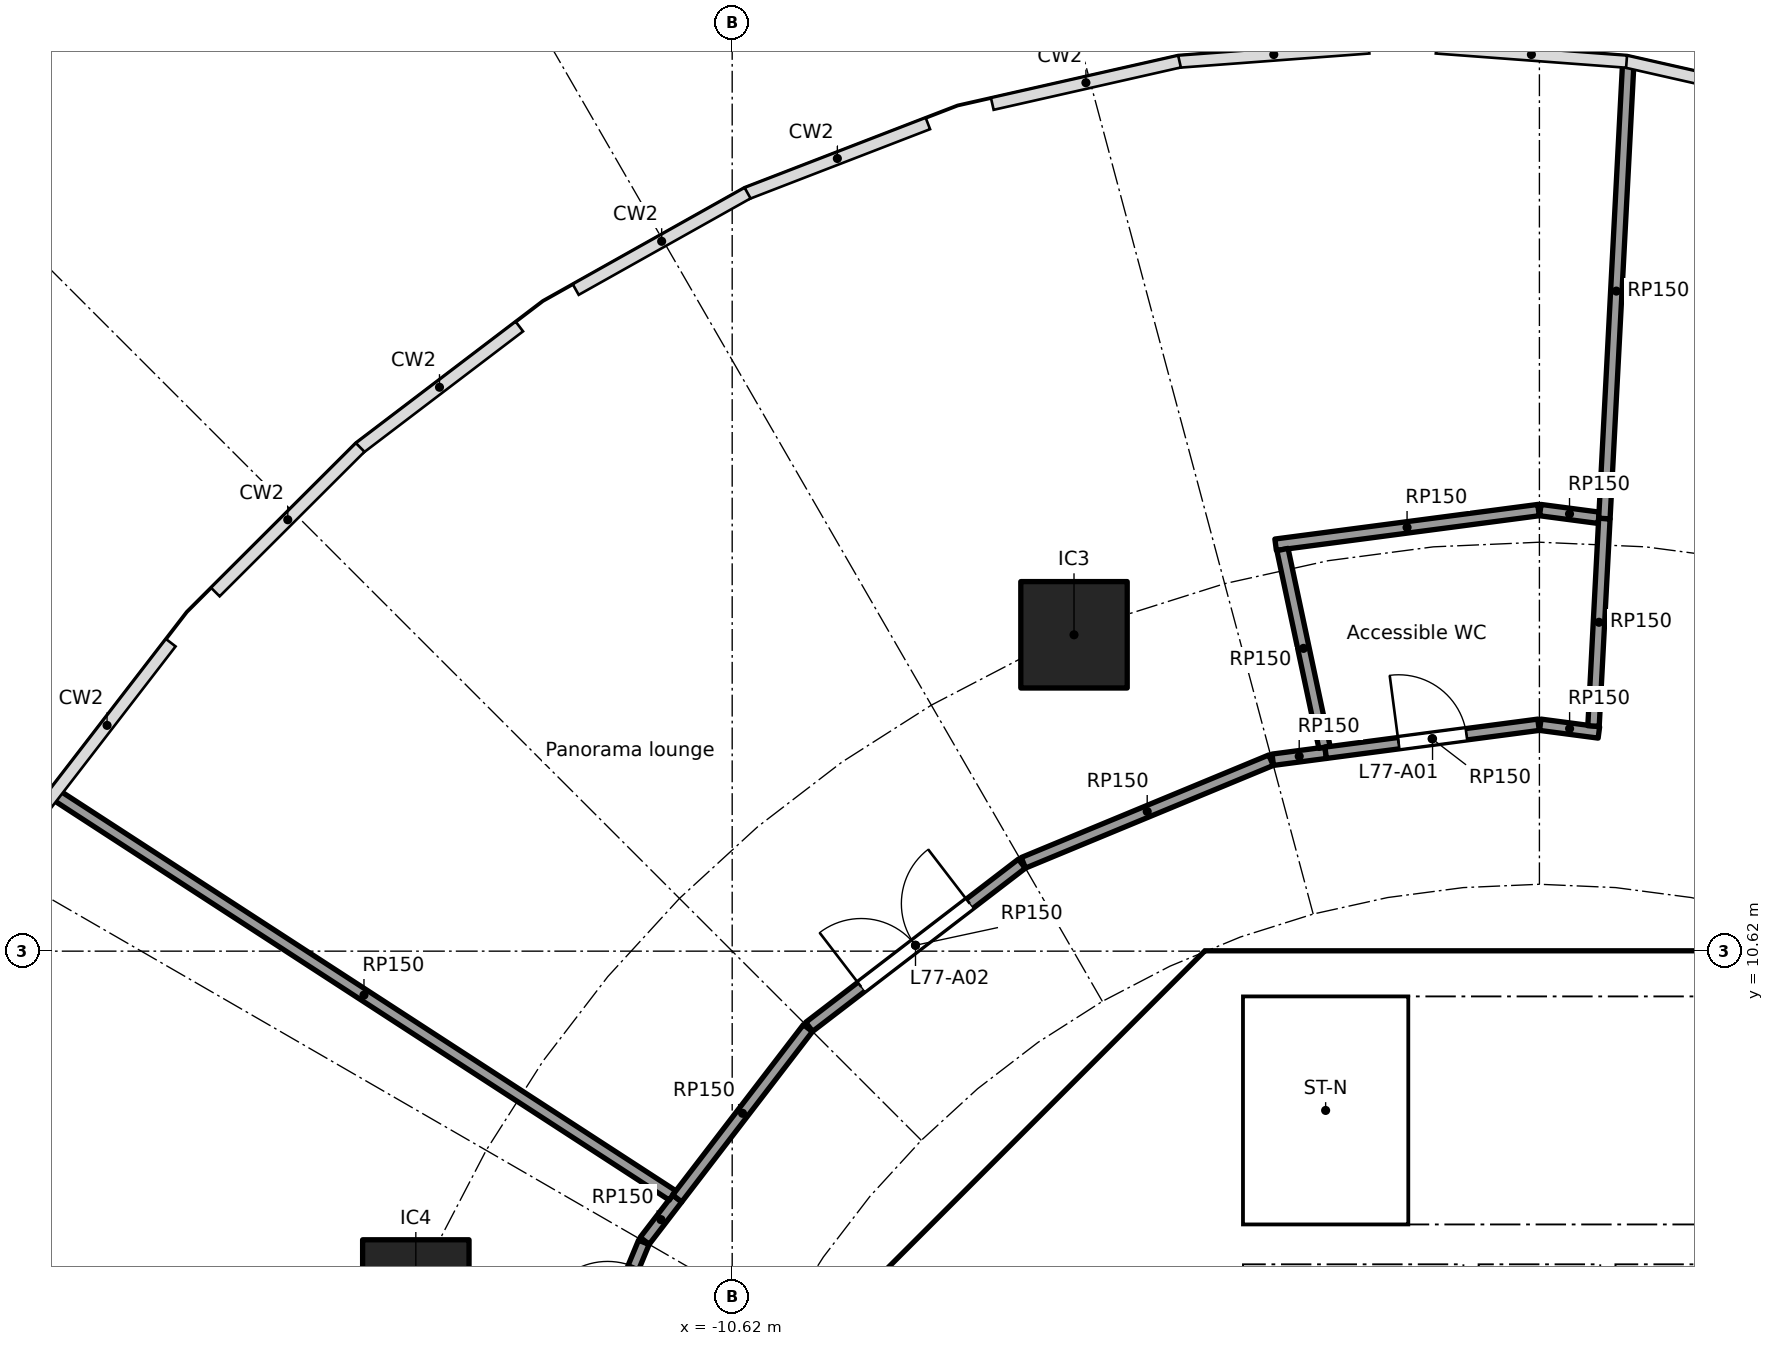
"""IFC4 building model, lengths in metres.
Left out: names, types, materials, properties, quantities, classifications, styles, units other than length and angle.
Written with IfcOpenShell. Run it as: python <this file> out.ifc"""

import sys

from ifc_helpers import new_model, si_unit, direction, frame, frame_2d, origin, origin_2d, place, context, subcontext, project, spatial, polyline, rectangle, outline, extrude, element, fill, save


model = new_model("IFC4")
c1 = context("Model", 3, precision=1e-05, world=origin(), true_north=direction((0.0, 1.0)))
c2 = subcontext(c1, "Body", "Model", "MODEL_VIEW")
j1 = project(units=[si_unit("LENGTHUNIT", "METRE"), si_unit("PLANEANGLEUNIT", "RADIAN")], contexts=[c1])
p1 = place(None, origin())
s1 = spatial("IfcSite", under=j1, at=p1, CompositionType="ELEMENT")
p2 = place(p1, origin())
s2 = spatial("IfcBuilding", under=s1, at=p2, CompositionType="ELEMENT")
p3 = place(p2, frame((0.0, 0.0, 310.3)))
s3 = spatial("IfcBuildingStorey", under=s2, at=p3, CompositionType="ELEMENT", Elevation=310.3)
for number, where, z_axis, x_axis in (
    (1, (-6.123, 14.782, 0.0), (0.0, 0.0, 1.0), (1.0, 0.0, 0.0)),
    (2, (-14.782, 6.123, 0.0), (0.0, 0.0, 1.0), (1.0, 0.0, 0.0)),
):
    element("IfcColumn", number, at=place(p3, frame(where, z_axis=z_axis, x_axis=x_axis)), inside=s3, PredefinedType="COLUMN", context=c2, shape_type="SweptSolid", body=[
        extrude(rectangle(XDim=1.4, YDim=1.4, at=origin_2d()), origin(), (0.0, 0.0, 1.0), 5.6),
    ])
p4 = place(p3, frame((-4.613, 9.988, 0.0), z_axis=(0.0, 0.0, 1.0), x_axis=(-0.707106781187, -0.707106781187, 0.0)))
e3 = element("IfcWall", 3, at=p4, inside=s3, PredefinedType="SHEAR", context=c2, shape_type="SweptSolid", body=[
    extrude(rectangle(XDim=7.602, YDim=0.6, at=frame_2d((3.801, 0.0))), origin(), (0.0, 0.0, 1.0), 5.3),
])
p5 = place(p4, frame((0.351, 0.0, 0.0)))
e4 = element("IfcOpeningElement", 4, at=p5, cuts=e3, PredefinedType="OPENING", context=c2, shape_type="SweptSolid", body=[
    extrude(rectangle(XDim=1.1, YDim=2.1, at=frame_2d((0.55, 1.05))), frame((0.0, 0.31, 0.0), z_axis=(0.0, -1.0, 0.0), x_axis=(1.0, 0.0, 0.0)), (0.0, 0.0, 1.0), 0.62),
])
p6 = place(p3, frame((-7.0, 4.1, 0.0), z_axis=(0.0, 0.0, 1.0), x_axis=(0.0, 1.0, 0.0)))
e5 = element("IfcWall", 5, at=p6, inside=s3, PredefinedType="PARTITIONING", context=c2, shape_type="SweptSolid", body=[
    extrude(rectangle(XDim=2.927, YDim=0.15, at=frame_2d((1.463, 0.0))), origin(), (0.0, 0.0, 1.0), 5.3),
])
p7 = place(p6, frame((1.051, 0.0, 0.0)))
e6 = element("IfcOpeningElement", 6, at=p7, cuts=e5, PredefinedType="OPENING", context=c2, shape_type="SweptSolid", body=[
    extrude(rectangle(XDim=0.9, YDim=2.1, at=frame_2d((0.45, 1.05))), frame((0.0, 0.085, 0.0), z_axis=(0.0, -1.0, 0.0), x_axis=(1.0, 0.0, 0.0)), (0.0, 0.0, 1.0), 0.17),
])
p8 = place(p3, frame((-4.0, 4.3, 0.0), z_axis=(0.0, 0.0, 1.0), x_axis=(0.0, 1.0, 0.0)))
e7 = element("IfcWall", 7, at=p8, inside=s3, PredefinedType="SOLIDWALL", context=c2, shape_type="SweptSolid", body=[
    extrude(rectangle(XDim=2.2, YDim=0.2, at=frame_2d((1.1, 0.0))), origin(), (0.0, 0.0, 1.0), 5.3),
])
p9 = place(p8, frame((0.55, 0.0, 0.0)))
e8 = element("IfcOpeningElement", 8, at=p9, cuts=e7, PredefinedType="OPENING", context=c2, shape_type="SweptSolid", body=[
    extrude(rectangle(XDim=1.1, YDim=2.1, at=frame_2d((0.55, 1.05))), frame((0.0, 0.11, 0.0), z_axis=(0.0, -1.0, 0.0), x_axis=(1.0, 0.0, 0.0)), (0.0, 0.0, 1.0), 0.22),
])
p10 = place(p3, origin())
e9 = element("IfcWall", 9, at=p10, inside=s3, PredefinedType="SHEAR", context=c2, shape_type="SweptSolid", body=[
    extrude(outline(polyline([(-4.152, 10.025), (-4.401, 9.776), (-4.825, 10.2), (-4.401, 10.625), (4.401, 10.625), (4.825, 10.2), (4.401, 9.776), (4.152, 10.025), (-4.152, 10.025)])), origin(), (0.0, 0.0, 1.0), 5.3),
])
for number, where, z_axis, x_axis in (
    (10, (-0.9, 4.3, 0.0), (0.0, 0.0, 1.0), (0.0, 1.0, 0.0)),
    (11, (0.9, 4.3, 0.0), (0.0, 0.0, 1.0), (0.0, 1.0, 0.0)),
):
    element("IfcWall", number, at=place(p3, frame(where, z_axis=z_axis, x_axis=x_axis)), inside=s3, PredefinedType="SOLIDWALL", context=c2, shape_type="SweptSolid", body=[
        extrude(rectangle(XDim=2.2, YDim=0.2, at=frame_2d((1.1, 0.0))), origin(), (0.0, 0.0, 1.0), 5.3),
    ])
p11 = place(p3, origin())
e12 = element("IfcWall", 12, at=p11, inside=s3, PredefinedType="SOLIDWALL", context=c2, shape_type="SweptSolid", body=[
    extrude(outline(polyline([(-3.9, 7.025), (-4.1, 7.025), (-4.1, 10.025), (-3.9, 10.025), (-3.9, 7.025)])), origin(), (0.0, 0.0, 1.0), 5.3),
])
p12 = place(p3, origin())
e13 = element("IfcWall", 13, at=p12, inside=s3, PredefinedType="SOLIDWALL", context=c2, shape_type="SweptSolid", body=[
    extrude(outline(polyline([(4.1, 6.5), (-4.1, 6.5), (-4.1, 7.025), (4.1, 7.025), (4.1, 6.5)])), origin(), (0.0, 0.0, 1.0), 5.3),
])
p13 = place(p3, frame((-13.132, 3.531, 0.0), z_axis=(0.0, 0.0, 1.0), x_axis=(0.382677866108, 0.923881838111, 0.0)))
e14 = element("IfcWall", 14, at=p13, inside=s3, PredefinedType="PARTITIONING", context=c2, shape_type="SweptSolid", body=[
    extrude(rectangle(XDim=3.527, YDim=0.15, at=frame_2d((1.763, 0.0))), origin(), (0.0, 0.0, 1.0), 5.3),
])
p14 = place(p13, frame((2.281, 0.0, 0.0)))
e15 = element("IfcOpeningElement", 15, at=p14, cuts=e14, PredefinedType="OPENING", context=c2, shape_type="SweptSolid", body=[
    extrude(rectangle(XDim=0.9, YDim=2.1, at=frame_2d((0.45, 1.05))), frame((0.0, 0.085, 0.0), z_axis=(0.0, -1.0, 0.0), x_axis=(1.0, 0.0, 0.0)), (0.0, 0.0, 1.0), 0.17),
])
p15 = place(p3, frame((-11.771, 6.809, 0.0), z_axis=(0.0, 0.0, 1.0), x_axis=(0.608752635326, 0.793360087844, 0.0)))
e16 = element("IfcWall", 16, at=p15, inside=s3, PredefinedType="PARTITIONING", context=c2, shape_type="SweptSolid", body=[
    extrude(rectangle(XDim=0.702, YDim=0.15, at=frame_2d((0.351, 0.0))), origin(), (0.0, 0.0, 1.0), 5.3),
])
p16 = place(p3, frame((-11.406, 7.407, 0.0), z_axis=(0.0, 0.0, 1.0), x_axis=(-0.838666041452, 0.54464600514, 0.0)))
e17 = element("IfcWall", 17, at=p16, inside=s3, PredefinedType="PARTITIONING", context=c2, shape_type="SweptSolid", body=[
    extrude(rectangle(XDim=9.677, YDim=0.15, at=frame_2d((4.838, 0.0))), origin(), (0.0, 0.0, 1.0), 5.3),
])
p17 = place(p3, frame((-11.343, 7.366, 0.0), z_axis=(0.0, 0.0, 1.0), x_axis=(0.608732750311, 0.793375345407, 0.0)))
e18 = element("IfcWall", 18, at=p17, inside=s3, PredefinedType="PARTITIONING", context=c2, shape_type="SweptSolid", body=[
    extrude(rectangle(XDim=2.824, YDim=0.15, at=frame_2d((1.412, 0.0))), origin(), (0.0, 0.0, 1.0), 5.3),
])
p18 = place(p3, frame((-9.607, 9.624, 0.0), z_axis=(0.0, 0.0, 1.0), x_axis=(0.793372307201, 0.608736710054, 0.0)))
e19 = element("IfcWall", 19, at=p18, inside=s3, PredefinedType="PARTITIONING", context=c2, shape_type="SweptSolid", body=[
    extrude(rectangle(XDim=3.527, YDim=0.15, at=frame_2d((1.763, 0.0))), origin(), (0.0, 0.0, 1.0), 5.3),
])
p19 = place(p18, frame((0.863, 0.0, 0.0)))
e20 = element("IfcOpeningElement", 20, at=p19, cuts=e19, PredefinedType="OPENING", context=c2, shape_type="SweptSolid", body=[
    extrude(rectangle(XDim=1.8, YDim=2.1, at=frame_2d((0.9, 1.05))), frame((0.0, 0.085, 0.0), z_axis=(0.0, -1.0, 0.0), x_axis=(1.0, 0.0, 0.0)), (0.0, 0.0, 1.0), 0.17),
])
p20 = place(p3, frame((-6.789, 11.782, 0.0), z_axis=(0.0, 0.0, 1.0), x_axis=(0.923881838111, 0.382677866108, 0.0)))
e21 = element("IfcWall", 21, at=p20, inside=s3, PredefinedType="PARTITIONING", context=c2, shape_type="SweptSolid", body=[
    extrude(rectangle(XDim=3.527, YDim=0.15, at=frame_2d((1.763, 0.0))), origin(), (0.0, 0.0, 1.0), 5.3),
])
p21 = place(p3, frame((-3.508, 13.138, 0.0), z_axis=(0.0, 0.0, 1.0), x_axis=(0.991460212813, 0.130409533429, 0.0)))
e22 = element("IfcWall", 22, at=p21, inside=s3, PredefinedType="PARTITIONING", context=c2, shape_type="SweptSolid", body=[
    extrude(rectangle(XDim=0.702, YDim=0.15, at=frame_2d((0.351, 0.0))), origin(), (0.0, 0.0, 1.0), 5.3),
])
p22 = place(p3, frame((-3.471, 15.967, 0.0), z_axis=(0.0, 0.0, 1.0), x_axis=(0.991447148591, 0.130508817908, 0.0)))
e23 = element("IfcWall", 23, at=p22, inside=s3, PredefinedType="PARTITIONING", context=c2, shape_type="SweptSolid", body=[
    extrude(rectangle(XDim=3.489, YDim=0.15, at=frame_2d((1.744, 0.0))), origin(), (0.0, 0.0, 1.0), 5.3),
])
p23 = place(p3, frame((-2.828, 13.303, 0.0), z_axis=(0.0, 0.0, 1.0), x_axis=(-0.207935646859, 0.978142508413, 0.0)))
e24 = element("IfcWall", 24, at=p23, inside=s3, PredefinedType="PARTITIONING", context=c2, shape_type="SweptSolid", body=[
    extrude(rectangle(XDim=2.658, YDim=0.15, at=frame_2d((1.329, 0.0))), origin(), (0.0, 0.0, 1.0), 5.3),
])
p24 = place(p3, frame((-2.812, 13.23, 0.0), z_axis=(0.0, 0.0, 1.0), x_axis=(0.991445467051, 0.130521591565, 0.0)))
e25 = element("IfcWall", 25, at=p24, inside=s3, PredefinedType="PARTITIONING", context=c2, shape_type="SweptSolid", body=[
    extrude(rectangle(XDim=2.824, YDim=0.15, at=frame_2d((1.412, 0.0))), origin(), (0.0, 0.0, 1.0), 5.3),
])
p25 = place(p24, frame((0.968, 0.0, 0.0)))
e26 = element("IfcOpeningElement", 26, at=p25, cuts=e25, PredefinedType="OPENING", context=c2, shape_type="SweptSolid", body=[
    extrude(rectangle(XDim=0.9, YDim=2.1, at=frame_2d((0.45, 1.05))), frame((0.0, 0.085, 0.0), z_axis=(0.0, -1.0, 0.0), x_axis=(1.0, 0.0, 0.0)), (0.0, 0.0, 1.0), 0.17),
])
p26 = place(p3, frame((0.012, 13.598, 0.0), z_axis=(0.0, 0.0, 1.0), x_axis=(0.991470322154, -0.130332652421, 0.0)))
e27 = element("IfcWall", 27, at=p26, inside=s3, PredefinedType="PARTITIONING", context=c2, shape_type="SweptSolid", body=[
    extrude(rectangle(XDim=0.777, YDim=0.15, at=frame_2d((0.389, 0.0))), origin(), (0.0, 0.0, 1.0), 5.3),
])
p27 = place(p3, frame((0.012, 16.423, 0.0), z_axis=(0.0, 0.0, 1.0), x_axis=(0.991462869305, -0.130389335417, 0.0)))
e28 = element("IfcWall", 28, at=p27, inside=s3, PredefinedType="PARTITIONING", context=c2, shape_type="SweptSolid", body=[
    extrude(rectangle(XDim=0.775, YDim=0.15, at=frame_2d((0.388, 0.0))), origin(), (0.0, 0.0, 1.0), 5.3),
])
p28 = place(p3, frame((0.712, 13.582, 0.0), z_axis=(0.0, 0.0, 1.0), x_axis=(0.052343174033, 0.99862915646, 0.0)))
e29 = element("IfcWall", 29, at=p28, inside=s3, PredefinedType="PARTITIONING", context=c2, shape_type="SweptSolid", body=[
    extrude(rectangle(XDim=2.733, YDim=0.15, at=frame_2d((1.367, 0.0))), origin(), (0.0, 0.0, 1.0), 5.3),
])
p29 = place(p3, frame((0.855, 16.312, 0.0), z_axis=(0.0, 0.0, 1.0), x_axis=(0.052310787201, 0.99863085349, 0.0)))
e30 = element("IfcWall", 30, at=p29, inside=s3, PredefinedType="PARTITIONING", context=c2, shape_type="SweptSolid", body=[
    extrude(rectangle(XDim=5.993, YDim=0.15, at=frame_2d((2.996, 0.0))), origin(), (0.0, 0.0, 1.0), 5.3),
])
p30 = place(p5, origin())
e31 = element("IfcDoor", 31, at=p30, inside=s3, OperationType="SINGLE_SWING_LEFT", PredefinedType="DOOR", context=c2, shape_type="SweptSolid", body=[
    extrude(rectangle(XDim=1.1, YDim=2.1, at=frame_2d((0.55, 1.05))), frame((0.0, 0.025, 0.0), z_axis=(0.0, -1.0, 0.0), x_axis=(1.0, 0.0, 0.0)), (0.0, 0.0, 1.0), 0.05),
])
fill(e4, e31)
p31 = place(p25, origin())
e32 = element("IfcDoor", 32, at=p31, inside=s3, OperationType="SINGLE_SWING_LEFT", PredefinedType="DOOR", context=c2, shape_type="SweptSolid", body=[
    extrude(rectangle(XDim=0.9, YDim=2.1, at=frame_2d((0.45, 1.05))), frame((0.0, 0.025, 0.0), z_axis=(0.0, -1.0, 0.0), x_axis=(1.0, 0.0, 0.0)), (0.0, 0.0, 1.0), 0.05),
])
fill(e26, e32)
p32 = place(p19, origin())
e33 = element("IfcDoor", 33, at=p32, inside=s3, OperationType="DOUBLE_DOOR_SINGLE_SWING", PredefinedType="DOOR", context=c2, shape_type="SweptSolid", body=[
    extrude(rectangle(XDim=1.8, YDim=2.1, at=frame_2d((0.9, 1.05))), frame((0.0, 0.025, 0.0), z_axis=(0.0, -1.0, 0.0), x_axis=(1.0, 0.0, 0.0)), (0.0, 0.0, 1.0), 0.05),
])
fill(e20, e33)
p33 = place(p14, origin())
e34 = element("IfcDoor", 34, at=p33, inside=s3, OperationType="SINGLE_SWING_LEFT", PredefinedType="DOOR", context=c2, shape_type="SweptSolid", body=[
    extrude(rectangle(XDim=0.9, YDim=2.1, at=frame_2d((0.45, 1.05))), frame((0.0, 0.025, 0.0), z_axis=(0.0, -1.0, 0.0), x_axis=(1.0, 0.0, 0.0)), (0.0, 0.0, 1.0), 0.05),
])
fill(e15, e34)
save(model, sys.argv[1])
